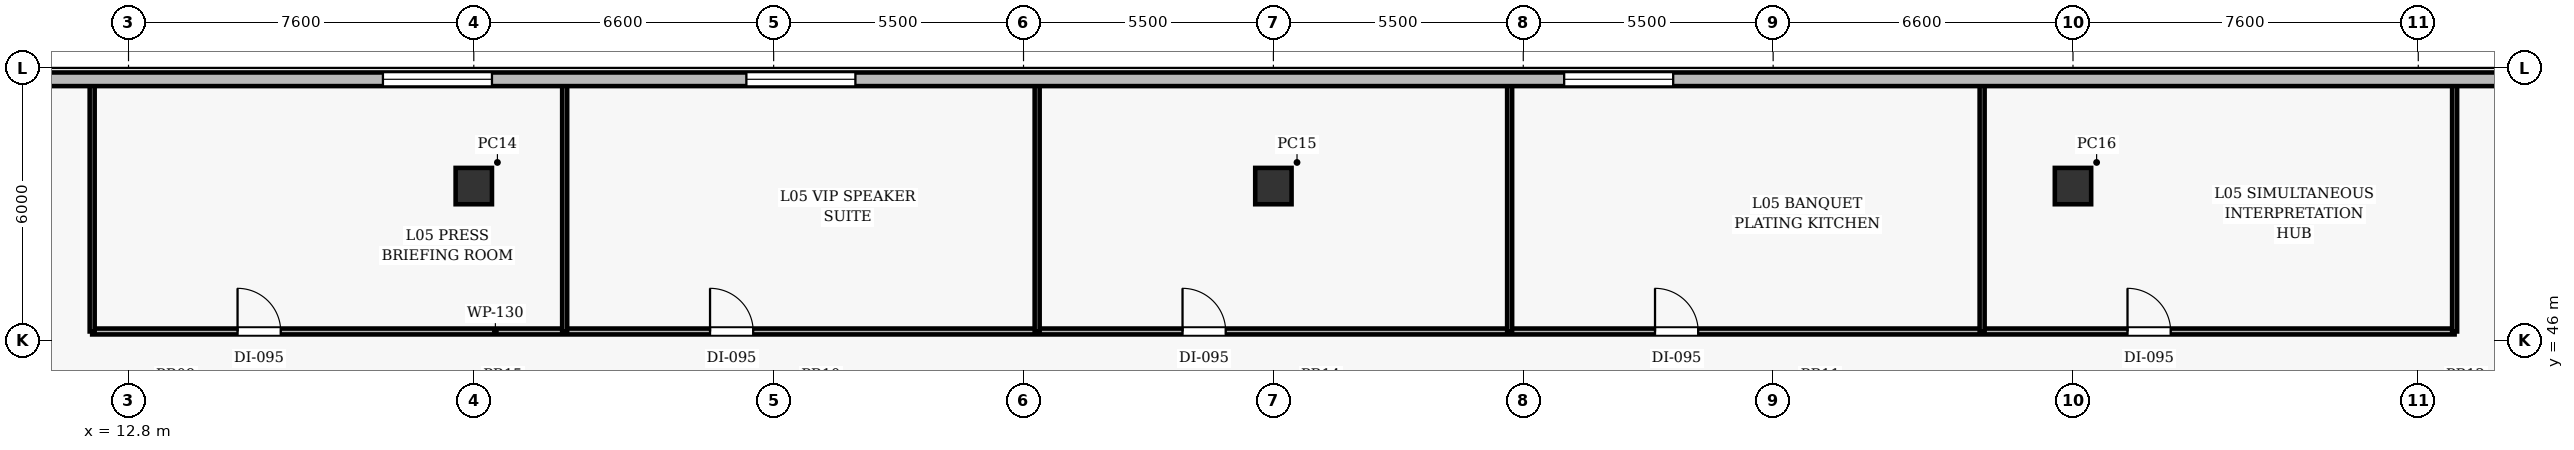
"""IFC4 building model, lengths in metres.
Left out: names, types, materials, properties, quantities, classifications, styles, units other than length and angle.
Written with IfcOpenShell. Run it as: python <this file> out.ifc"""

import sys

from ifc_helpers import new_model, si_unit, direction, frame, frame_2d, origin, origin_2d, place, context, subcontext, project, spatial, rectangle, extrude, element, fill, save


model = new_model("IFC4")
c1 = context("Model", 3, precision=1e-05, world=origin(), true_north=direction((0.0, 1.0)))
c2 = subcontext(c1, "Body", "Model", "MODEL_VIEW")
j1 = project(units=[si_unit("LENGTHUNIT", "METRE"), si_unit("PLANEANGLEUNIT", "RADIAN")], contexts=[c1])
p1 = place(None, origin())
s1 = spatial("IfcSite", under=j1, at=p1, CompositionType="ELEMENT")
p2 = place(p1, origin())
s2 = spatial("IfcBuilding", under=s1, at=p2, CompositionType="ELEMENT")
p3 = place(p2, frame((0.0, 0.0, 30.0)))
s3 = spatial("IfcBuildingStorey", under=s2, at=p3, CompositionType="ELEMENT", Elevation=30.0)
for number, where, z_axis, x_axis in (
    (1, (20.4, 49.4, 0.0), (0.0, 0.0, 1.0), (1.0, 0.0, 0.0)),
    (2, (38.0, 49.4, 0.0), (0.0, 0.0, 1.0), (1.0, 0.0, 0.0)),
    (3, (55.6, 49.4, 0.0), (0.0, 0.0, 1.0), (1.0, 0.0, 0.0)),
):
    element("IfcColumn", number, at=place(p3, frame(where, z_axis=z_axis, x_axis=x_axis)), inside=s3, PredefinedType="COLUMN", context=c2, shape_type="SweptSolid", body=[
        extrude(rectangle(XDim=0.8, YDim=0.8, at=origin_2d()), origin(), (0.0, 0.0, 1.0), 5.4),
    ])
p4 = place(p3, frame((12.0, 46.2, 0.0), z_axis=(0.0, 0.0, 1.0), x_axis=(1.0, 0.0, 0.0)))
e4 = element("IfcWall", 4, at=p4, inside=s3, PredefinedType="PARTITIONING", context=c2, shape_type="SweptSolid", body=[
    extrude(rectangle(XDim=52.0, YDim=0.13, at=frame_2d((26.0, 0.0))), origin(), (0.0, 0.0, 1.0), 4.06),
])
p5 = place(p4, frame((3.2, 0.0, 0.0)))
e5 = element("IfcOpeningElement", 5, at=p5, cuts=e4, PredefinedType="OPENING", context=c2, shape_type="SweptSolid", body=[
    extrude(rectangle(XDim=0.95, YDim=2.15, at=frame_2d((0.475, 1.075))), frame((0.0, 0.075, 0.0), z_axis=(0.0, -1.0, 0.0), x_axis=(1.0, 0.0, 0.0)), (0.0, 0.0, 1.0), 0.15),
])
p6 = place(p4, frame((13.6, 0.0, 0.0)))
e6 = element("IfcOpeningElement", 6, at=p6, cuts=e4, PredefinedType="OPENING", context=c2, shape_type="SweptSolid", body=[
    extrude(rectangle(XDim=0.95, YDim=2.15, at=frame_2d((0.475, 1.075))), frame((0.0, 0.075, 0.0), z_axis=(0.0, -1.0, 0.0), x_axis=(1.0, 0.0, 0.0)), (0.0, 0.0, 1.0), 0.15),
])
p7 = place(p4, frame((24.0, 0.0, 0.0)))
e7 = element("IfcOpeningElement", 7, at=p7, cuts=e4, PredefinedType="OPENING", context=c2, shape_type="SweptSolid", body=[
    extrude(rectangle(XDim=0.95, YDim=2.15, at=frame_2d((0.475, 1.075))), frame((0.0, 0.075, 0.0), z_axis=(0.0, -1.0, 0.0), x_axis=(1.0, 0.0, 0.0)), (0.0, 0.0, 1.0), 0.15),
])
p8 = place(p4, frame((34.4, 0.0, 0.0)))
e8 = element("IfcOpeningElement", 8, at=p8, cuts=e4, PredefinedType="OPENING", context=c2, shape_type="SweptSolid", body=[
    extrude(rectangle(XDim=0.95, YDim=2.15, at=frame_2d((0.475, 1.075))), frame((0.0, 0.075, 0.0), z_axis=(0.0, -1.0, 0.0), x_axis=(1.0, 0.0, 0.0)), (0.0, 0.0, 1.0), 0.15),
])
p9 = place(p4, frame((44.8, 0.0, 0.0)))
e9 = element("IfcOpeningElement", 9, at=p9, cuts=e4, PredefinedType="OPENING", context=c2, shape_type="SweptSolid", body=[
    extrude(rectangle(XDim=0.95, YDim=2.15, at=frame_2d((0.475, 1.075))), frame((0.0, 0.075, 0.0), z_axis=(0.0, -1.0, 0.0), x_axis=(1.0, 0.0, 0.0)), (0.0, 0.0, 1.0), 0.15),
])
for number, where, z_axis, x_axis in (
    (10, (12.0, 46.2, 0.0), (0.0, 0.0, 1.0), (0.0, 1.0, 0.0)),
    (11, (22.4, 46.2, 0.0), (0.0, 0.0, 1.0), (0.0, 1.0, 0.0)),
    (12, (32.8, 46.2, 0.0), (0.0, 0.0, 1.0), (0.0, 1.0, 0.0)),
    (13, (43.2, 46.2, 0.0), (0.0, 0.0, 1.0), (0.0, 1.0, 0.0)),
    (14, (53.6, 46.2, 0.0), (0.0, 0.0, 1.0), (0.0, 1.0, 0.0)),
    (15, (64.0, 46.2, 0.0), (0.0, 0.0, 1.0), (0.0, 1.0, 0.0)),
):
    element("IfcWall", number, at=place(p3, frame(where, z_axis=z_axis, x_axis=x_axis)), inside=s3, PredefinedType="PARTITIONING", context=c2, shape_type="SweptSolid", body=[
        extrude(rectangle(XDim=5.66, YDim=0.11, at=frame_2d((2.83, 0.0))), origin(), (0.0, 0.0, 1.0), 4.06),
    ])
p10 = place(p3, frame((0.4, 51.75, 0.0), z_axis=(0.0, 0.0, 1.0), x_axis=(1.0, 0.0, 0.0)))
e16 = element("IfcWall", 16, at=p10, inside=s3, PredefinedType="SOLIDWALL", context=c2, shape_type="SweptSolid", body=[
    extrude(rectangle(XDim=75.2, YDim=0.3, at=frame_2d((37.6, 0.0))), origin(), (0.0, 0.0, 1.0), 4.51),
])
p11 = place(p10, frame((18.0, 0.0, 0.95)))
e17 = element("IfcOpeningElement", 17, at=p11, cuts=e16, PredefinedType="OPENING", context=c2, shape_type="SweptSolid", body=[
    extrude(rectangle(XDim=2.4, YDim=2.0, at=frame_2d((1.2, 1.0))), frame((0.0, 0.16, 0.0), z_axis=(0.0, -1.0, 0.0), x_axis=(1.0, 0.0, 0.0)), (0.0, 0.0, 1.0), 0.32),
])
p12 = place(p10, frame((26.0, 0.0, 0.95)))
e18 = element("IfcOpeningElement", 18, at=p12, cuts=e16, PredefinedType="OPENING", context=c2, shape_type="SweptSolid", body=[
    extrude(rectangle(XDim=2.4, YDim=2.0, at=frame_2d((1.2, 1.0))), frame((0.0, 0.16, 0.0), z_axis=(0.0, -1.0, 0.0), x_axis=(1.0, 0.0, 0.0)), (0.0, 0.0, 1.0), 0.32),
])
p13 = place(p10, frame((44.0, 0.0, 0.95)))
e19 = element("IfcOpeningElement", 19, at=p13, cuts=e16, PredefinedType="OPENING", context=c2, shape_type="SweptSolid", body=[
    extrude(rectangle(XDim=2.4, YDim=2.0, at=frame_2d((1.2, 1.0))), frame((0.0, 0.16, 0.0), z_axis=(0.0, -1.0, 0.0), x_axis=(1.0, 0.0, 0.0)), (0.0, 0.0, 1.0), 0.32),
])
p14 = place(p5, origin())
e20 = element("IfcDoor", 20, at=p14, inside=s3, OperationType="SINGLE_SWING_LEFT", PredefinedType="DOOR", context=c2, shape_type="SweptSolid", body=[
    extrude(rectangle(XDim=0.95, YDim=2.15, at=frame_2d((0.475, 1.075))), frame((0.0, 0.025, 0.0), z_axis=(0.0, -1.0, 0.0), x_axis=(1.0, 0.0, 0.0)), (0.0, 0.0, 1.0), 0.05),
])
fill(e5, e20)
p15 = place(p6, origin())
e21 = element("IfcDoor", 21, at=p15, inside=s3, OperationType="SINGLE_SWING_LEFT", PredefinedType="DOOR", context=c2, shape_type="SweptSolid", body=[
    extrude(rectangle(XDim=0.95, YDim=2.15, at=frame_2d((0.475, 1.075))), frame((0.0, 0.025, 0.0), z_axis=(0.0, -1.0, 0.0), x_axis=(1.0, 0.0, 0.0)), (0.0, 0.0, 1.0), 0.05),
])
fill(e6, e21)
p16 = place(p7, origin())
e22 = element("IfcDoor", 22, at=p16, inside=s3, OperationType="SINGLE_SWING_LEFT", PredefinedType="DOOR", context=c2, shape_type="SweptSolid", body=[
    extrude(rectangle(XDim=0.95, YDim=2.15, at=frame_2d((0.475, 1.075))), frame((0.0, 0.025, 0.0), z_axis=(0.0, -1.0, 0.0), x_axis=(1.0, 0.0, 0.0)), (0.0, 0.0, 1.0), 0.05),
])
fill(e7, e22)
p17 = place(p8, origin())
e23 = element("IfcDoor", 23, at=p17, inside=s3, OperationType="SINGLE_SWING_LEFT", PredefinedType="DOOR", context=c2, shape_type="SweptSolid", body=[
    extrude(rectangle(XDim=0.95, YDim=2.15, at=frame_2d((0.475, 1.075))), frame((0.0, 0.025, 0.0), z_axis=(0.0, -1.0, 0.0), x_axis=(1.0, 0.0, 0.0)), (0.0, 0.0, 1.0), 0.05),
])
fill(e8, e23)
p18 = place(p9, origin())
e24 = element("IfcDoor", 24, at=p18, inside=s3, OperationType="SINGLE_SWING_LEFT", PredefinedType="DOOR", context=c2, shape_type="SweptSolid", body=[
    extrude(rectangle(XDim=0.95, YDim=2.15, at=frame_2d((0.475, 1.075))), frame((0.0, 0.025, 0.0), z_axis=(0.0, -1.0, 0.0), x_axis=(1.0, 0.0, 0.0)), (0.0, 0.0, 1.0), 0.05),
])
fill(e9, e24)
p19 = place(p11, origin())
e25 = element("IfcWindow", 25, at=p19, inside=s3, PartitioningType="SINGLE_PANEL", PredefinedType="WINDOW", context=c2, shape_type="SweptSolid", body=[
    extrude(rectangle(XDim=2.4, YDim=2.0, at=frame_2d((1.2, 1.0))), frame((0.0, 0.03, 0.0), z_axis=(0.0, -1.0, 0.0), x_axis=(1.0, 0.0, 0.0)), (0.0, 0.0, 1.0), 0.06),
])
fill(e17, e25)
p20 = place(p12, origin())
e26 = element("IfcWindow", 26, at=p20, inside=s3, PartitioningType="SINGLE_PANEL", PredefinedType="WINDOW", context=c2, shape_type="SweptSolid", body=[
    extrude(rectangle(XDim=2.4, YDim=2.0, at=frame_2d((1.2, 1.0))), frame((0.0, 0.03, 0.0), z_axis=(0.0, -1.0, 0.0), x_axis=(1.0, 0.0, 0.0)), (0.0, 0.0, 1.0), 0.06),
])
fill(e18, e26)
p21 = place(p13, origin())
e27 = element("IfcWindow", 27, at=p21, inside=s3, PartitioningType="SINGLE_PANEL", PredefinedType="WINDOW", context=c2, shape_type="SweptSolid", body=[
    extrude(rectangle(XDim=2.4, YDim=2.0, at=frame_2d((1.2, 1.0))), frame((0.0, 0.03, 0.0), z_axis=(0.0, -1.0, 0.0), x_axis=(1.0, 0.0, 0.0)), (0.0, 0.0, 1.0), 0.06),
])
fill(e19, e27)
save(model, sys.argv[1])
